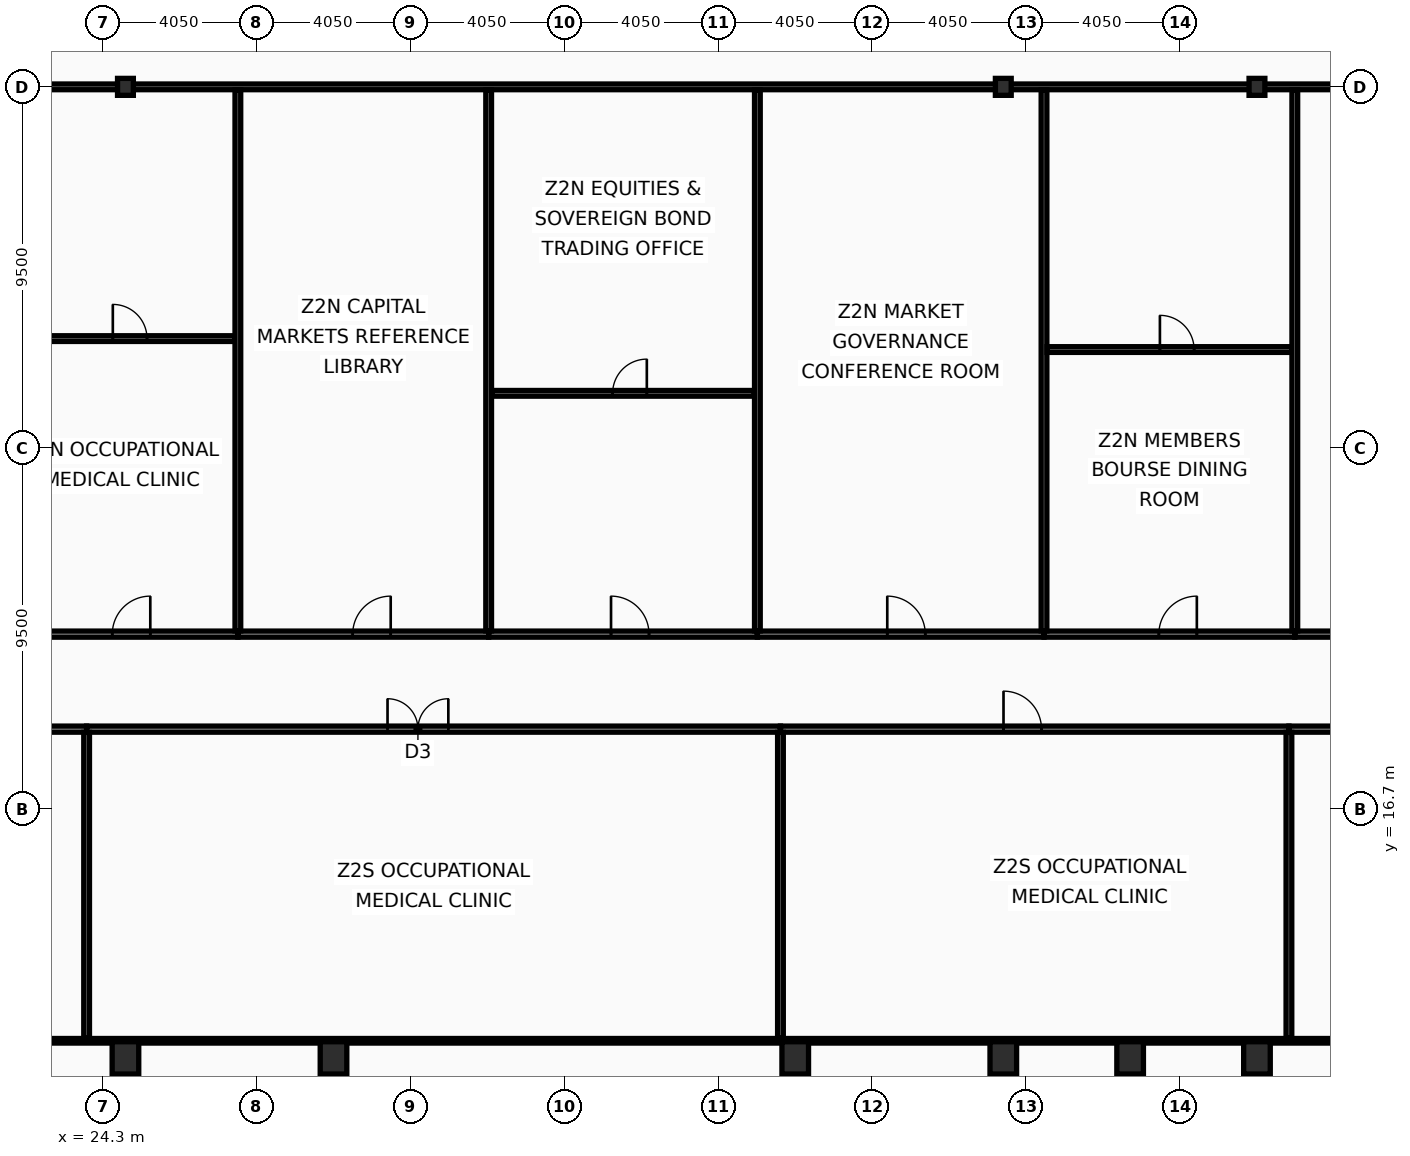
"""IFC4 building model, lengths in metres.
Left out: names, types, materials, properties, quantities, classifications, styles, units other than length and angle.
Written with IfcOpenShell. Run it as: python <this file> out.ifc"""

import sys

from ifc_helpers import new_model, si_unit, direction, frame, frame_2d, origin, origin_2d, place, context, subcontext, project, spatial, rectangle, hollow_rectangle, i_section, extrude, element, fill, save


model = new_model("IFC4")
c1 = context("Model", 3, precision=1e-05, world=origin(), true_north=direction((0.0, 1.0)))
c2 = subcontext(c1, "Body", "Model", "MODEL_VIEW")
j1 = project(units=[si_unit("LENGTHUNIT", "METRE"), si_unit("PLANEANGLEUNIT", "RADIAN")], contexts=[c1])
p1 = place(None, origin())
s1 = spatial("IfcSite", under=j1, at=p1, CompositionType="ELEMENT")
p2 = place(p1, origin())
s2 = spatial("IfcBuilding", under=s1, at=p2, CompositionType="ELEMENT")
p3 = place(p2, frame((0.0, 0.0, 111.0)))
s3 = spatial("IfcBuildingStorey", under=s2, at=p3, CompositionType="ELEMENT", Elevation=111.0)
for number, where, z_axis, x_axis in (
    (1, (24.9, 10.15, 0.0), (0.0, 0.0, 1.0), (1.0, 0.0, 0.0)),
    (2, (30.375, 10.15, 0.0), (0.0, 0.0, 1.0), (1.0, 0.0, 0.0)),
    (3, (42.525, 10.15, 0.0), (0.0, 0.0, 1.0), (1.0, 0.0, 0.0)),
    (4, (48.0, 10.15, 0.0), (0.0, 0.0, 1.0), (1.0, 0.0, 0.0)),
    (5, (51.337, 10.15, 0.0), (0.0, 0.0, 1.0), (1.0, 0.0, 0.0)),
    (6, (54.675, 10.15, 0.0), (0.0, 0.0, 1.0), (1.0, 0.0, 0.0)),
):
    element("IfcColumn", number, at=place(p3, frame(where, z_axis=z_axis, x_axis=x_axis)), inside=s3, PredefinedType="COLUMN", context=c2, shape_type="SweptSolid", body=[
        extrude(hollow_rectangle(XDim=0.7, YDim=0.85, WallThickness=0.05, at=origin_2d()), origin(), (0.0, 0.0, 1.0), 3.6),
    ])
for number, where, z_axis, x_axis in (
    (7, (24.9, 35.7, 0.0), (0.0, 0.0, 1.0), (1.0, 0.0, 0.0)),
    (8, (48.0, 35.7, 0.0), (0.0, 0.0, 1.0), (1.0, 0.0, 0.0)),
    (9, (54.675, 35.7, 0.0), (0.0, 0.0, 1.0), (1.0, 0.0, 0.0)),
):
    element("IfcColumn", number, at=place(p3, frame(where, z_axis=z_axis, x_axis=x_axis)), inside=s3, PredefinedType="COLUMN", context=c2, shape_type="SweptSolid", body=[
        extrude(i_section(OverallWidth=0.416, OverallDepth=0.446, WebThickness=0.039, FlangeThickness=0.063, at=origin_2d()), origin(), (0.0, 0.0, 1.0), 3.6),
    ])
p4 = place(p3, frame((11.542, 18.8, 0.0), z_axis=(0.0, 0.0, 1.0), x_axis=(1.0, 0.0, 0.0)))
e10 = element("IfcWall", 10, at=p4, inside=s3, PredefinedType="PARTITIONING", context=c2, shape_type="SweptSolid", body=[
    extrude(rectangle(XDim=12.337, YDim=0.16, at=frame_2d((6.168, 0.0))), origin(), (0.0, 0.0, 1.0), 2.73),
])
p5 = place(p4, frame((5.431, 0.0, 0.0)))
e11 = element("IfcOpeningElement", 11, at=p5, cuts=e10, PredefinedType="OPENING", context=c2, shape_type="SweptSolid", body=[
    extrude(rectangle(XDim=1.0, YDim=2.05, at=frame_2d((0.5, 1.025))), frame((0.0, 0.09, 0.0), z_axis=(0.0, -1.0, 0.0), x_axis=(1.0, 0.0, 0.0)), (0.0, 0.0, 1.0), 0.18),
])
p6 = place(p3, frame((23.878, 18.8, 0.0), z_axis=(0.0, 0.0, 1.0), x_axis=(1.0, 0.0, 0.0)))
e12 = element("IfcWall", 12, at=p6, inside=s3, PredefinedType="PARTITIONING", context=c2, shape_type="SweptSolid", body=[
    extrude(rectangle(XDim=18.258, YDim=0.16, at=frame_2d((9.129, 0.0))), origin(), (0.0, 0.0, 1.0), 2.73),
])
p7 = place(p6, frame((7.918, 0.0, 0.0)))
e13 = element("IfcOpeningElement", 13, at=p7, cuts=e12, PredefinedType="OPENING", context=c2, shape_type="SweptSolid", body=[
    extrude(rectangle(XDim=1.6, YDim=2.15, at=frame_2d((0.8, 1.075))), frame((0.0, 0.09, 0.0), z_axis=(0.0, -1.0, 0.0), x_axis=(1.0, 0.0, 0.0)), (0.0, 0.0, 1.0), 0.18),
])
p8 = place(p3, frame((23.878, 10.665, 0.0), z_axis=(0.0, 0.0, 1.0), x_axis=(0.0, 1.0, 0.0)))
e14 = element("IfcWall", 14, at=p8, inside=s3, PredefinedType="PARTITIONING", context=c2, shape_type="SweptSolid", body=[
    extrude(rectangle(XDim=8.05, YDim=0.15, at=frame_2d((4.025, 0.0))), origin(), (0.0, 0.0, 1.0), 2.88),
])
p9 = place(p3, frame((42.136, 18.8, 0.0), z_axis=(0.0, 0.0, 1.0), x_axis=(1.0, 0.0, 0.0)))
e15 = element("IfcWall", 15, at=p9, inside=s3, PredefinedType="PARTITIONING", context=c2, shape_type="SweptSolid", body=[
    extrude(rectangle(XDim=13.38, YDim=0.16, at=frame_2d((6.69, 0.0))), origin(), (0.0, 0.0, 1.0), 2.73),
])
p10 = place(p9, frame((5.87, 0.0, 0.0)))
e16 = element("IfcOpeningElement", 16, at=p10, cuts=e15, PredefinedType="OPENING", context=c2, shape_type="SweptSolid", body=[
    extrude(rectangle(XDim=1.0, YDim=2.05, at=frame_2d((0.5, 1.025))), frame((0.0, 0.09, 0.0), z_axis=(0.0, -1.0, 0.0), x_axis=(1.0, 0.0, 0.0)), (0.0, 0.0, 1.0), 0.18),
])
p11 = place(p3, frame((42.136, 10.665, 0.0), z_axis=(0.0, 0.0, 1.0), x_axis=(0.0, 1.0, 0.0)))
e17 = element("IfcWall", 17, at=p11, inside=s3, PredefinedType="PARTITIONING", context=c2, shape_type="SweptSolid", body=[
    extrude(rectangle(XDim=8.05, YDim=0.15, at=frame_2d((4.025, 0.0))), origin(), (0.0, 0.0, 1.0), 2.73),
])
p12 = place(p3, frame((55.516, 18.8, 0.0), z_axis=(0.0, 0.0, 1.0), x_axis=(1.0, 0.0, 0.0)))
e18 = element("IfcWall", 18, at=p12, inside=s3, PredefinedType="PARTITIONING", context=c2, shape_type="SweptSolid", body=[
    extrude(rectangle(XDim=13.354, YDim=0.16, at=frame_2d((6.677, 0.0))), origin(), (0.0, 0.0, 1.0), 2.73),
])
p13 = place(p12, frame((5.859, 0.0, 0.0)))
e19 = element("IfcOpeningElement", 19, at=p13, cuts=e18, PredefinedType="OPENING", context=c2, shape_type="SweptSolid", body=[
    extrude(rectangle(XDim=1.0, YDim=2.05, at=frame_2d((0.5, 1.025))), frame((0.0, 0.09, 0.0), z_axis=(0.0, -1.0, 0.0), x_axis=(1.0, 0.0, 0.0)), (0.0, 0.0, 1.0), 0.18),
])
p14 = place(p3, frame((55.516, 10.665, 0.0), z_axis=(0.0, 0.0, 1.0), x_axis=(0.0, 1.0, 0.0)))
e20 = element("IfcWall", 20, at=p14, inside=s3, PredefinedType="PARTITIONING", context=c2, shape_type="SweptSolid", body=[
    extrude(rectangle(XDim=8.05, YDim=0.15, at=frame_2d((4.025, 0.0))), origin(), (0.0, 0.0, 1.0), 3.44),
])
p15 = place(p3, frame((21.81, 35.7, 0.0), z_axis=(0.0, 0.0, 1.0), x_axis=(1.0, 0.0, 0.0)))
e21 = element("IfcWall", 21, at=p15, inside=s3, PredefinedType="PARTITIONING", context=c2, shape_type="SweptSolid", body=[
    extrude(rectangle(XDim=46.995, YDim=0.15, at=frame_2d((23.498, 0.0))), origin(), (0.0, 0.0, 1.0), 2.73),
])
p16 = place(p3, frame((21.73, 21.3, 0.0), z_axis=(0.0, 0.0, 1.0), x_axis=(1.0, 0.0, 0.0)))
e22 = element("IfcWall", 22, at=p16, inside=s3, PredefinedType="PARTITIONING", context=c2, shape_type="SweptSolid", body=[
    extrude(rectangle(XDim=6.128, YDim=0.16, at=frame_2d((3.064, 0.0))), origin(), (0.0, 0.0, 1.0), 2.73),
])
p17 = place(p16, frame((2.824, 0.0, 0.0)))
e23 = element("IfcOpeningElement", 23, at=p17, cuts=e22, PredefinedType="OPENING", context=c2, shape_type="SweptSolid", body=[
    extrude(rectangle(XDim=1.0, YDim=2.05, at=frame_2d((0.5, 1.025))), frame((0.0, 0.09, 0.0), z_axis=(0.0, -1.0, 0.0), x_axis=(1.0, 0.0, 0.0)), (0.0, 0.0, 1.0), 0.18),
])
p18 = place(p3, frame((21.81, 29.076, 0.0), z_axis=(0.0, 0.0, 1.0), x_axis=(1.0, 0.0, 0.0)))
e24 = element("IfcWall", 24, at=p18, inside=s3, PredefinedType="PARTITIONING", context=c2, shape_type="SweptSolid", body=[
    extrude(rectangle(XDim=5.968, YDim=0.15, at=frame_2d((2.984, 0.0))), origin(), (0.0, 0.0, 1.0), 2.73),
])
p19 = place(p18, frame((2.758, 0.0, 0.0)))
e25 = element("IfcOpeningElement", 25, at=p19, cuts=e24, PredefinedType="OPENING", context=c2, shape_type="SweptSolid", body=[
    extrude(rectangle(XDim=0.9, YDim=2.05, at=frame_2d((0.45, 1.025))), frame((0.0, 0.085, 0.0), z_axis=(0.0, -1.0, 0.0), x_axis=(1.0, 0.0, 0.0)), (0.0, 0.0, 1.0), 0.17),
])
p20 = place(p3, frame((27.858, 21.3, 0.0), z_axis=(0.0, 0.0, 1.0), x_axis=(1.0, 0.0, 0.0)))
e26 = element("IfcWall", 26, at=p20, inside=s3, PredefinedType="PARTITIONING", context=c2, shape_type="SweptSolid", body=[
    extrude(rectangle(XDim=6.6, YDim=0.16, at=frame_2d((3.3, 0.0))), origin(), (0.0, 0.0, 1.0), 2.73),
])
p21 = place(p20, frame((3.022, 0.0, 0.0)))
e27 = element("IfcOpeningElement", 27, at=p21, cuts=e26, PredefinedType="OPENING", context=c2, shape_type="SweptSolid", body=[
    extrude(rectangle(XDim=1.0, YDim=2.05, at=frame_2d((0.5, 1.025))), frame((0.0, 0.09, 0.0), z_axis=(0.0, -1.0, 0.0), x_axis=(1.0, 0.0, 0.0)), (0.0, 0.0, 1.0), 0.18),
])
p22 = place(p3, frame((27.858, 21.385, 0.0), z_axis=(0.0, 0.0, 1.0), x_axis=(0.0, 1.0, 0.0)))
e28 = element("IfcWall", 28, at=p22, inside=s3, PredefinedType="PARTITIONING", context=c2, shape_type="SweptSolid", body=[
    extrude(rectangle(XDim=14.235, YDim=0.15, at=frame_2d((7.118, 0.0))), origin(), (0.0, 0.0, 1.0), 2.88),
])
p23 = place(p3, frame((34.458, 21.3, 0.0), z_axis=(0.0, 0.0, 1.0), x_axis=(1.0, 0.0, 0.0)))
e29 = element("IfcWall", 29, at=p23, inside=s3, PredefinedType="PARTITIONING", context=c2, shape_type="SweptSolid", body=[
    extrude(rectangle(XDim=7.071, YDim=0.16, at=frame_2d((3.536, 0.0))), origin(), (0.0, 0.0, 1.0), 3.44),
])
p24 = place(p23, frame((3.22, 0.0, 0.0)))
e30 = element("IfcOpeningElement", 30, at=p24, cuts=e29, PredefinedType="OPENING", context=c2, shape_type="SweptSolid", body=[
    extrude(rectangle(XDim=1.0, YDim=2.05, at=frame_2d((0.5, 1.025))), frame((0.0, 0.09, 0.0), z_axis=(0.0, -1.0, 0.0), x_axis=(1.0, 0.0, 0.0)), (0.0, 0.0, 1.0), 0.18),
])
p25 = place(p3, frame((34.458, 21.385, 0.0), z_axis=(0.0, 0.0, 1.0), x_axis=(0.0, 1.0, 0.0)))
e31 = element("IfcWall", 31, at=p25, inside=s3, PredefinedType="PARTITIONING", context=c2, shape_type="SweptSolid", body=[
    extrude(rectangle(XDim=14.235, YDim=0.15, at=frame_2d((7.118, 0.0))), origin(), (0.0, 0.0, 1.0), 2.88),
])
p26 = place(p3, frame((34.538, 27.636, 0.0), z_axis=(0.0, 0.0, 1.0), x_axis=(1.0, 0.0, 0.0)))
e32 = element("IfcWall", 32, at=p26, inside=s3, PredefinedType="PARTITIONING", context=c2, shape_type="SweptSolid", body=[
    extrude(rectangle(XDim=6.911, YDim=0.15, at=frame_2d((3.456, 0.0))), origin(), (0.0, 0.0, 1.0), 3.44),
])
p27 = place(p26, frame((3.182, 0.0, 0.0)))
e33 = element("IfcOpeningElement", 33, at=p27, cuts=e32, PredefinedType="OPENING", context=c2, shape_type="SweptSolid", body=[
    extrude(rectangle(XDim=0.9, YDim=2.05, at=frame_2d((0.45, 1.025))), frame((0.0, 0.085, 0.0), z_axis=(0.0, -1.0, 0.0), x_axis=(1.0, 0.0, 0.0)), (0.0, 0.0, 1.0), 0.17),
])
p28 = place(p3, frame((41.529, 21.3, 0.0), z_axis=(0.0, 0.0, 1.0), x_axis=(1.0, 0.0, 0.0)))
e34 = element("IfcWall", 34, at=p28, inside=s3, PredefinedType="PARTITIONING", context=c2, shape_type="SweptSolid", body=[
    extrude(rectangle(XDim=7.542, YDim=0.16, at=frame_2d((3.771, 0.0))), origin(), (0.0, 0.0, 1.0), 2.73),
])
p29 = place(p28, frame((3.418, 0.0, 0.0)))
e35 = element("IfcOpeningElement", 35, at=p29, cuts=e34, PredefinedType="OPENING", context=c2, shape_type="SweptSolid", body=[
    extrude(rectangle(XDim=1.0, YDim=2.05, at=frame_2d((0.5, 1.025))), frame((0.0, 0.09, 0.0), z_axis=(0.0, -1.0, 0.0), x_axis=(1.0, 0.0, 0.0)), (0.0, 0.0, 1.0), 0.18),
])
p30 = place(p3, frame((41.529, 21.385, 0.0), z_axis=(0.0, 0.0, 1.0), x_axis=(0.0, 1.0, 0.0)))
e36 = element("IfcWall", 36, at=p30, inside=s3, PredefinedType="PARTITIONING", context=c2, shape_type="SweptSolid", body=[
    extrude(rectangle(XDim=14.235, YDim=0.15, at=frame_2d((7.118, 0.0))), origin(), (0.0, 0.0, 1.0), 2.88),
])
p31 = place(p3, frame((49.071, 21.3, 0.0), z_axis=(0.0, 0.0, 1.0), x_axis=(1.0, 0.0, 0.0)))
e37 = element("IfcWall", 37, at=p31, inside=s3, PredefinedType="PARTITIONING", context=c2, shape_type="SweptSolid", body=[
    extrude(rectangle(XDim=6.6, YDim=0.16, at=frame_2d((3.3, 0.0))), origin(), (0.0, 0.0, 1.0), 2.73),
])
p32 = place(p31, frame((3.022, 0.0, 0.0)))
e38 = element("IfcOpeningElement", 38, at=p32, cuts=e37, PredefinedType="OPENING", context=c2, shape_type="SweptSolid", body=[
    extrude(rectangle(XDim=1.0, YDim=2.05, at=frame_2d((0.5, 1.025))), frame((0.0, 0.09, 0.0), z_axis=(0.0, -1.0, 0.0), x_axis=(1.0, 0.0, 0.0)), (0.0, 0.0, 1.0), 0.18),
])
p33 = place(p3, frame((49.071, 21.385, 0.0), z_axis=(0.0, 0.0, 1.0), x_axis=(0.0, 1.0, 0.0)))
e39 = element("IfcWall", 39, at=p33, inside=s3, PredefinedType="PARTITIONING", context=c2, shape_type="SweptSolid", body=[
    extrude(rectangle(XDim=14.235, YDim=0.15, at=frame_2d((7.118, 0.0))), origin(), (0.0, 0.0, 1.0), 2.88),
])
p34 = place(p3, frame((49.151, 28.788, 0.0), z_axis=(0.0, 0.0, 1.0), x_axis=(1.0, 0.0, 0.0)))
e40 = element("IfcWall", 40, at=p34, inside=s3, PredefinedType="PARTITIONING", context=c2, shape_type="SweptSolid", body=[
    extrude(rectangle(XDim=6.44, YDim=0.15, at=frame_2d((3.22, 0.0))), origin(), (0.0, 0.0, 1.0), 2.73),
])
p35 = place(p34, frame((2.97, 0.0, 0.0)))
e41 = element("IfcOpeningElement", 41, at=p35, cuts=e40, PredefinedType="OPENING", context=c2, shape_type="SweptSolid", body=[
    extrude(rectangle(XDim=0.9, YDim=2.05, at=frame_2d((0.45, 1.025))), frame((0.0, 0.085, 0.0), z_axis=(0.0, -1.0, 0.0), x_axis=(1.0, 0.0, 0.0)), (0.0, 0.0, 1.0), 0.17),
])
p36 = place(p3, frame((55.671, 21.3, 0.0), z_axis=(0.0, 0.0, 1.0), x_axis=(1.0, 0.0, 0.0)))
e42 = element("IfcWall", 42, at=p36, inside=s3, PredefinedType="PARTITIONING", context=c2, shape_type="SweptSolid", body=[
    extrude(rectangle(XDim=7.071, YDim=0.16, at=frame_2d((3.535, 0.0))), origin(), (0.0, 0.0, 1.0), 3.44),
])
p37 = place(p36, frame((3.22, 0.0, 0.0)))
e43 = element("IfcOpeningElement", 43, at=p37, cuts=e42, PredefinedType="OPENING", context=c2, shape_type="SweptSolid", body=[
    extrude(rectangle(XDim=1.0, YDim=2.05, at=frame_2d((0.5, 1.025))), frame((0.0, 0.09, 0.0), z_axis=(0.0, -1.0, 0.0), x_axis=(1.0, 0.0, 0.0)), (0.0, 0.0, 1.0), 0.18),
])
p38 = place(p3, frame((55.671, 21.385, 0.0), z_axis=(0.0, 0.0, 1.0), x_axis=(0.0, 1.0, 0.0)))
e44 = element("IfcWall", 44, at=p38, inside=s3, PredefinedType="PARTITIONING", context=c2, shape_type="SweptSolid", body=[
    extrude(rectangle(XDim=14.235, YDim=0.15, at=frame_2d((7.118, 0.0))), origin(), (0.0, 0.0, 1.0), 2.73),
])
p39 = place(p3, frame((4.095, 10.6, 0.0), z_axis=(0.0, 0.0, 1.0), x_axis=(1.0, 0.0, 0.0)))
e45 = element("IfcWall", 45, at=p39, inside=s3, PredefinedType="PARTITIONING", context=c2, shape_type="SweptSolid", body=[
    extrude(rectangle(XDim=64.71, YDim=0.12, at=frame_2d((32.355, 0.0))), origin(), (0.0, 0.0, 1.0), 2.73),
])
p40 = place(p7, origin())
e46 = element("IfcDoor", 46, at=p40, inside=s3, OperationType="DOUBLE_DOOR_SINGLE_SWING", PredefinedType="DOOR", context=c2, shape_type="SweptSolid", body=[
    extrude(rectangle(XDim=1.6, YDim=2.15, at=frame_2d((0.8, 1.075))), frame((0.0, 0.025, 0.0), z_axis=(0.0, -1.0, 0.0), x_axis=(1.0, 0.0, 0.0)), (0.0, 0.0, 1.0), 0.05),
])
fill(e13, e46)
p41 = place(p10, origin())
e47 = element("IfcDoor", 47, at=p41, inside=s3, OperationType="SINGLE_SWING_LEFT", PredefinedType="DOOR", context=c2, shape_type="SweptSolid", body=[
    extrude(rectangle(XDim=1.0, YDim=2.05, at=frame_2d((0.5, 1.025))), frame((0.0, 0.025, 0.0), z_axis=(0.0, -1.0, 0.0), x_axis=(1.0, 0.0, 0.0)), (0.0, 0.0, 1.0), 0.05),
])
fill(e16, e47)
p42 = place(p17, origin())
e48 = element("IfcDoor", 48, at=p42, inside=s3, OperationType="SINGLE_SWING_RIGHT", PredefinedType="DOOR", context=c2, shape_type="SweptSolid", body=[
    extrude(rectangle(XDim=1.0, YDim=2.05, at=frame_2d((0.5, 1.025))), frame((0.0, 0.025, 0.0), z_axis=(0.0, -1.0, 0.0), x_axis=(1.0, 0.0, 0.0)), (0.0, 0.0, 1.0), 0.05),
])
fill(e23, e48)
p43 = place(p19, origin())
e49 = element("IfcDoor", 49, at=p43, inside=s3, OperationType="SINGLE_SWING_LEFT", PredefinedType="DOOR", context=c2, shape_type="SweptSolid", body=[
    extrude(rectangle(XDim=0.9, YDim=2.05, at=frame_2d((0.45, 1.025))), frame((0.0, 0.025, 0.0), z_axis=(0.0, -1.0, 0.0), x_axis=(1.0, 0.0, 0.0)), (0.0, 0.0, 1.0), 0.05),
])
fill(e25, e49)
p44 = place(p21, origin())
e50 = element("IfcDoor", 50, at=p44, inside=s3, OperationType="SINGLE_SWING_RIGHT", PredefinedType="DOOR", context=c2, shape_type="SweptSolid", body=[
    extrude(rectangle(XDim=1.0, YDim=2.05, at=frame_2d((0.5, 1.025))), frame((0.0, 0.025, 0.0), z_axis=(0.0, -1.0, 0.0), x_axis=(1.0, 0.0, 0.0)), (0.0, 0.0, 1.0), 0.05),
])
fill(e27, e50)
p45 = place(p24, origin())
e51 = element("IfcDoor", 51, at=p45, inside=s3, OperationType="SINGLE_SWING_LEFT", PredefinedType="DOOR", context=c2, shape_type="SweptSolid", body=[
    extrude(rectangle(XDim=1.0, YDim=2.05, at=frame_2d((0.5, 1.025))), frame((0.0, 0.025, 0.0), z_axis=(0.0, -1.0, 0.0), x_axis=(1.0, 0.0, 0.0)), (0.0, 0.0, 1.0), 0.05),
])
fill(e30, e51)
p46 = place(p27, origin())
e52 = element("IfcDoor", 52, at=p46, inside=s3, OperationType="SINGLE_SWING_RIGHT", PredefinedType="DOOR", context=c2, shape_type="SweptSolid", body=[
    extrude(rectangle(XDim=0.9, YDim=2.05, at=frame_2d((0.45, 1.025))), frame((0.0, 0.025, 0.0), z_axis=(0.0, -1.0, 0.0), x_axis=(1.0, 0.0, 0.0)), (0.0, 0.0, 1.0), 0.05),
])
fill(e33, e52)
p47 = place(p29, origin())
e53 = element("IfcDoor", 53, at=p47, inside=s3, OperationType="SINGLE_SWING_LEFT", PredefinedType="DOOR", context=c2, shape_type="SweptSolid", body=[
    extrude(rectangle(XDim=1.0, YDim=2.05, at=frame_2d((0.5, 1.025))), frame((0.0, 0.025, 0.0), z_axis=(0.0, -1.0, 0.0), x_axis=(1.0, 0.0, 0.0)), (0.0, 0.0, 1.0), 0.05),
])
fill(e35, e53)
p48 = place(p32, origin())
e54 = element("IfcDoor", 54, at=p48, inside=s3, OperationType="SINGLE_SWING_RIGHT", PredefinedType="DOOR", context=c2, shape_type="SweptSolid", body=[
    extrude(rectangle(XDim=1.0, YDim=2.05, at=frame_2d((0.5, 1.025))), frame((0.0, 0.025, 0.0), z_axis=(0.0, -1.0, 0.0), x_axis=(1.0, 0.0, 0.0)), (0.0, 0.0, 1.0), 0.05),
])
fill(e38, e54)
p49 = place(p35, origin())
e55 = element("IfcDoor", 55, at=p49, inside=s3, OperationType="SINGLE_SWING_LEFT", PredefinedType="DOOR", context=c2, shape_type="SweptSolid", body=[
    extrude(rectangle(XDim=0.9, YDim=2.05, at=frame_2d((0.45, 1.025))), frame((0.0, 0.025, 0.0), z_axis=(0.0, -1.0, 0.0), x_axis=(1.0, 0.0, 0.0)), (0.0, 0.0, 1.0), 0.05),
])
fill(e41, e55)
save(model, sys.argv[1])
